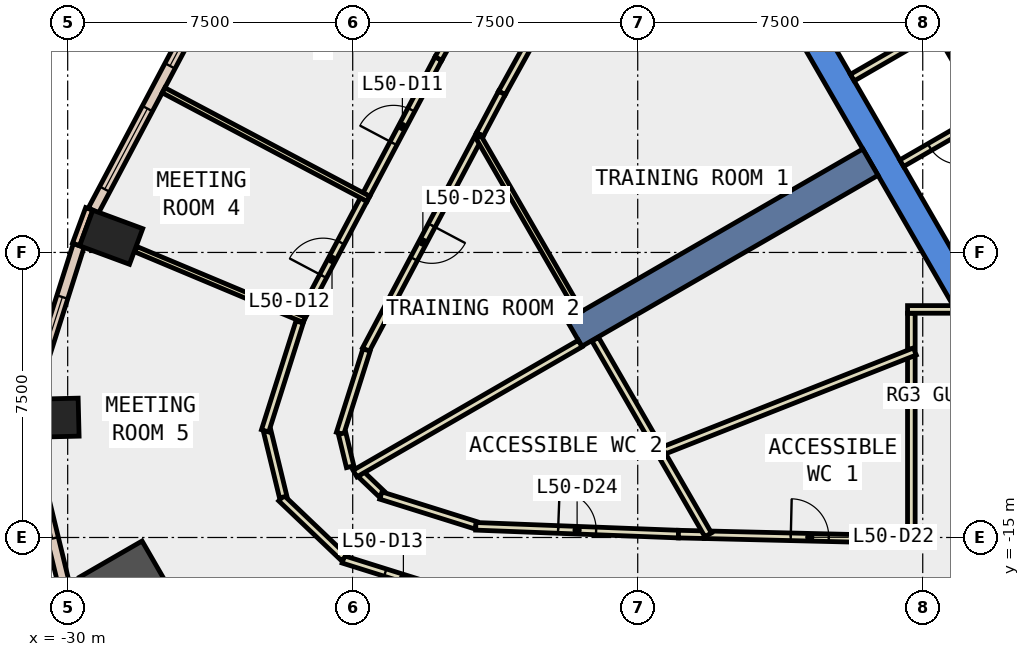
"""IFC4 building model, lengths in metres.
Left out: names, types, materials, properties, quantities, classifications, styles, units other than length and angle.
Written with IfcOpenShell. Run it as: python <this file> out.ifc"""

import sys

from ifc_helpers import new_model, si_unit, direction, frame, frame_2d, origin, origin_2d, place, context, subcontext, project, spatial, polyline, rectangle, outline, extrude, element, fill, save


model = new_model("IFC4")
c1 = context("Model", 3, precision=1e-05, world=origin(), true_north=direction((0.0, 1.0)))
c2 = subcontext(c1, "Body", "Model", "MODEL_VIEW")
j1 = project(units=[si_unit("LENGTHUNIT", "METRE"), si_unit("PLANEANGLEUNIT", "RADIAN")], contexts=[c1])
p1 = place(None, origin())
s1 = spatial("IfcSite", under=j1, at=p1, CompositionType="ELEMENT")
p2 = place(p1, origin())
s2 = spatial("IfcBuilding", under=s1, at=p2, CompositionType="ELEMENT")
p3 = place(p2, frame((0.0, 0.0, 223.4)))
s3 = spatial("IfcBuildingStorey", under=s2, at=p3, CompositionType="ELEMENT", Elevation=223.4)
for number, where, z_axis, x_axis in (
    (1, (-28.856, -7.1, -0.4), (0.0, 0.0, 1.0), (0.347, 0.938, 0.0)),
    (2, (-30.412, -11.851, -0.4), (0.0, 0.0, 1.0), (-0.025, 1.0, 0.0)),
):
    element("IfcColumn", number, at=place(p3, frame(where, z_axis=z_axis, x_axis=x_axis)), inside=s3, PredefinedType="COLUMN", context=c2, shape_type="SweptSolid", body=[
        extrude(rectangle(XDim=1.0, YDim=1.4, at=origin_2d()), origin(), (0.0, 0.0, 1.0), 4.2),
    ])
p4 = place(p3, frame((-28.39, -16.391, -0.4), z_axis=(0.0, 0.0, 1.0), x_axis=(0.866025403784, 0.5, 0.0)))
e3 = element("IfcColumn", 3, at=p4, inside=s3, PredefinedType="COLUMN", context=c2, shape_type="SweptSolid", body=[
    extrude(rectangle(XDim=1.9, YDim=1.9, at=origin_2d()), origin(), (0.0, 0.0, 1.0), 4.2),
])
p5 = place(p3, frame((0.0, 0.0, -0.4)))
e4 = element("IfcWall", 4, at=p5, inside=s3, PredefinedType="SHEAR", context=c2, shape_type="SweptSolid", body=[
    extrude(outline(polyline([(-13.279, 2.5), (-6.64, -9.0), (-6.235, -8.3), (-12.471, 2.5), (-13.279, 2.5)])), origin(), (0.0, 0.0, 1.0), 4.2),
])
p6 = place(p3, frame((-8.877, -5.125, -0.4), z_axis=(0.0, 0.0, 1.0), x_axis=(-0.866017533419, -0.500013631625, 0.0)))
e5 = element("IfcWall", 5, at=p6, inside=s3, PredefinedType="SHEAR", context=c2, shape_type="SweptSolid", body=[
    extrude(rectangle(XDim=9.0, YDim=0.8, at=frame_2d((4.5, 0.0))), origin(), (0.0, 0.0, 1.0), 4.2),
])
p7 = place(p3, frame((-29.433, -6.354, 0.0), z_axis=(0.0, 0.0, 1.0), x_axis=(-0.346892928577, -0.937904737222, 0.0)))
e6 = element("IfcWall", 6, at=p7, inside=s3, PredefinedType="STANDARD", context=c2, shape_type="SweptSolid", body=[
    extrude(rectangle(XDim=1.0, YDim=0.2, at=frame_2d((0.5, 0.0))), origin(), (0.0, 0.0, 1.0), 3.8),
])
p8 = place(p3, frame((-25.887, 0.09, 0.0), z_axis=(0.0, 0.0, 1.0), x_axis=(-0.468020680141, -0.8837175131, 0.0)))
e7 = element("IfcWall", 7, at=p8, inside=s3, PredefinedType="STANDARD", context=c2, shape_type="SweptSolid", body=[
    extrude(rectangle(XDim=7.34, YDim=0.3, at=frame_2d((3.67, 0.0))), origin(), (0.0, 0.0, 1.0), 3.8),
])
p9 = place(p8, frame((0.635, 0.0, 0.9)))
e8 = element("IfcOpeningElement", 8, at=p9, cuts=e7, PredefinedType="OPENING", context=c2, shape_type="SweptSolid", body=[
    extrude(rectangle(XDim=2.4, YDim=2.6, at=frame_2d((1.2, 1.3))), frame((0.0, 0.16, 0.0), z_axis=(0.0, -1.0, 0.0), x_axis=(1.0, 0.0, 0.0)), (0.0, 0.0, 1.0), 0.32),
])
p10 = place(p8, frame((4.305, 0.0, 0.9)))
e9 = element("IfcOpeningElement", 9, at=p10, cuts=e7, PredefinedType="OPENING", context=c2, shape_type="SweptSolid", body=[
    extrude(rectangle(XDim=2.4, YDim=2.6, at=frame_2d((1.2, 1.3))), frame((0.0, 0.16, 0.0), z_axis=(0.0, -1.0, 0.0), x_axis=(1.0, 0.0, 0.0)), (0.0, 0.0, 1.0), 0.32),
])
p11 = place(p3, frame((-29.71, -7.316, 0.0), z_axis=(0.0, 0.0, 1.0), x_axis=(-0.302195467572, -0.953245980521, 0.0)))
e10 = element("IfcWall", 10, at=p11, inside=s3, PredefinedType="STANDARD", context=c2, shape_type="SweptSolid", body=[
    extrude(rectangle(XDim=4.249, YDim=0.3, at=frame_2d((2.125, 0.0))), origin(), (0.0, 0.0, 1.0), 3.8),
])
p12 = place(p11, frame((1.424, 0.0, 0.9)))
e11 = element("IfcOpeningElement", 11, at=p12, cuts=e10, PredefinedType="OPENING", context=c2, shape_type="SweptSolid", body=[
    extrude(rectangle(XDim=1.4, YDim=2.6, at=frame_2d((0.7, 1.3))), frame((0.0, 0.16, 0.0), z_axis=(0.0, -1.0, 0.0), x_axis=(1.0, 0.0, 0.0)), (0.0, 0.0, 1.0), 0.32),
])
p13 = place(p3, frame((-31.038, -12.365, 0.0), z_axis=(0.0, 0.0, 1.0), x_axis=(0.235766276378, -0.971809787419, 0.0)))
e12 = element("IfcWall", 12, at=p13, inside=s3, PredefinedType="STANDARD", context=c2, shape_type="SweptSolid", body=[
    extrude(rectangle(XDim=4.077, YDim=0.3, at=frame_2d((2.039, 0.0))), origin(), (0.0, 0.0, 1.0), 3.8),
])
p14 = place(p13, frame((1.338, 0.0, 0.9)))
e13 = element("IfcOpeningElement", 13, at=p14, cuts=e12, PredefinedType="OPENING", context=c2, shape_type="SweptSolid", body=[
    extrude(rectangle(XDim=1.4, YDim=2.6, at=frame_2d((0.7, 1.3))), frame((0.0, 0.16, 0.0), z_axis=(0.0, -1.0, 0.0), x_axis=(1.0, 0.0, 0.0)), (0.0, 0.0, 1.0), 0.32),
])
p15 = place(p3, frame((-14.652, 3.783, 0.0), z_axis=(0.0, 0.0, 1.0), x_axis=(-0.484249955458, -0.874929700398, 0.0)))
e14 = element("IfcWall", 14, at=p15, inside=s3, PredefinedType="PARTITIONING", context=c2, shape_type="SweptSolid", body=[
    extrude(rectangle(XDim=8.099, YDim=0.2, at=frame_2d((4.049, 0.0))), origin(), (0.0, 0.0, 1.0), 3.8),
])
p16 = place(p15, frame((3.55, 0.0, 0.0)))
e15 = element("IfcOpeningElement", 15, at=p16, cuts=e14, PredefinedType="OPENING", context=c2, shape_type="SweptSolid", body=[
    extrude(rectangle(XDim=1.0, YDim=2.1, at=frame_2d((0.5, 1.05))), frame((0.0, 0.11, 0.0), z_axis=(0.0, -1.0, 0.0), x_axis=(1.0, 0.0, 0.0)), (0.0, 0.0, 1.0), 0.22),
])
p17 = place(p3, frame((-18.574, -3.303, 0.0), z_axis=(0.0, 0.0, 1.0), x_axis=(-0.468458328651, -0.883485593724, 0.0)))
e16 = element("IfcWall", 16, at=p17, inside=s3, PredefinedType="PARTITIONING", context=c2, shape_type="SweptSolid", body=[
    extrude(rectangle(XDim=1.238, YDim=0.2, at=frame_2d((0.619, 0.0))), origin(), (0.0, 0.0, 1.0), 3.8),
])
p18 = place(p3, frame((-13.246, -14.927, 0.0), z_axis=(0.0, 0.0, 1.0), x_axis=(0.999708107757, -0.024159869312, 0.0)))
e17 = element("IfcWall", 17, at=p18, inside=s3, PredefinedType="PARTITIONING", context=c2, shape_type="SweptSolid", body=[
    extrude(rectangle(XDim=5.548, YDim=0.2, at=frame_2d((2.774, 0.0))), origin(), (0.0, 0.0, 1.0), 3.8),
])
p19 = place(p18, frame((2.274, 0.0, 0.0)))
e18 = element("IfcOpeningElement", 18, at=p19, cuts=e17, PredefinedType="OPENING", context=c2, shape_type="SweptSolid", body=[
    extrude(rectangle(XDim=1.0, YDim=2.1, at=frame_2d((0.5, 1.05))), frame((0.0, 0.11, 0.0), z_axis=(0.0, -1.0, 0.0), x_axis=(1.0, 0.0, 0.0)), (0.0, 0.0, 1.0), 0.22),
])
p20 = place(p3, frame((-19.154, -4.397, 0.0), z_axis=(0.0, 0.0, 1.0), x_axis=(-0.468118749105, -0.883665568378, 0.0)))
e19 = element("IfcWall", 19, at=p20, inside=s3, PredefinedType="PARTITIONING", context=c2, shape_type="SweptSolid", body=[
    extrude(rectangle(XDim=6.409, YDim=0.2, at=frame_2d((3.204, 0.0))), origin(), (0.0, 0.0, 1.0), 3.8),
])
p21 = place(p20, frame((2.704, 0.0, 0.0)))
e20 = element("IfcOpeningElement", 20, at=p21, cuts=e19, PredefinedType="OPENING", context=c2, shape_type="SweptSolid", body=[
    extrude(rectangle(XDim=1.0, YDim=2.1, at=frame_2d((0.5, 1.05))), frame((0.0, 0.11, 0.0), z_axis=(0.0, -1.0, 0.0), x_axis=(1.0, 0.0, 0.0)), (0.0, 0.0, 1.0), 0.22),
])
p22 = place(p3, frame((-22.137, -10.067, 0.0), z_axis=(0.0, 0.0, 1.0), x_axis=(-0.302262657712, -0.953224677478, 0.0)))
e21 = element("IfcWall", 21, at=p22, inside=s3, PredefinedType="PARTITIONING", context=c2, shape_type="SweptSolid", body=[
    extrude(rectangle(XDim=2.303, YDim=0.2, at=frame_2d((1.151, 0.0))), origin(), (0.0, 0.0, 1.0), 3.8),
])
p23 = place(p3, frame((-22.779, -12.264, 0.0), z_axis=(0.0, 0.0, 1.0), x_axis=(0.2356388299, -0.971840697771, 0.0)))
e22 = element("IfcWall", 22, at=p23, inside=s3, PredefinedType="PARTITIONING", context=c2, shape_type="SweptSolid", body=[
    extrude(rectangle(XDim=0.9, YDim=0.2, at=frame_2d((0.45, 0.0))), origin(), (0.0, 0.0, 1.0), 3.8),
])
p24 = place(p3, frame((-22.281, -13.337, 0.0), z_axis=(0.0, 0.0, 1.0), x_axis=(0.723443840005, -0.690383234413, 0.0)))
e23 = element("IfcWall", 23, at=p24, inside=s3, PredefinedType="PARTITIONING", context=c2, shape_type="SweptSolid", body=[
    extrude(rectangle(XDim=0.753, YDim=0.2, at=frame_2d((0.376, 0.0))), origin(), (0.0, 0.0, 1.0), 3.8),
])
p25 = place(p3, frame((-21.759, -13.896, 0.0), z_axis=(0.0, 0.0, 1.0), x_axis=(0.954254371194, -0.298995978328, 0.0)))
e24 = element("IfcWall", 24, at=p25, inside=s3, PredefinedType="PARTITIONING", context=c2, shape_type="SweptSolid", body=[
    extrude(rectangle(XDim=2.622, YDim=0.2, at=frame_2d((1.311, 0.0))), origin(), (0.0, 0.0, 1.0), 3.8),
])
p26 = place(p3, frame((-19.261, -14.706, 0.0), z_axis=(0.0, 0.0, 1.0), x_axis=(0.999262930749, -0.038387435847, 0.0)))
e25 = element("IfcWall", 25, at=p26, inside=s3, PredefinedType="PARTITIONING", context=c2, shape_type="SweptSolid", body=[
    extrude(rectangle(XDim=5.336, YDim=0.2, at=frame_2d((2.668, 0.0))), origin(), (0.0, 0.0, 1.0), 3.8),
])
p27 = place(p26, frame((2.168, 0.0, 0.0)))
e26 = element("IfcOpeningElement", 26, at=p27, cuts=e25, PredefinedType="OPENING", context=c2, shape_type="SweptSolid", body=[
    extrude(rectangle(XDim=1.0, YDim=2.1, at=frame_2d((0.5, 1.05))), frame((0.0, 0.11, 0.0), z_axis=(0.0, -1.0, 0.0), x_axis=(1.0, 0.0, 0.0)), (0.0, 0.0, 1.0), 0.22),
])
p28 = place(p3, frame((-13.929, -14.911, 0.0), z_axis=(0.0, 0.0, 1.0), x_axis=(0.999721713829, -0.023590144123, 0.0)))
e27 = element("IfcWall", 27, at=p28, inside=s3, PredefinedType="PARTITIONING", context=c2, shape_type="SweptSolid", body=[
    extrude(rectangle(XDim=0.683, YDim=0.2, at=frame_2d((0.342, 0.0))), origin(), (0.0, 0.0, 1.0), 3.8),
])
p29 = place(p3, frame((-22.14, -5.976, 0.0), z_axis=(0.0, 0.0, 1.0), x_axis=(0.467979143965, 0.883739509592, 0.0)))
e28 = element("IfcWall", 28, at=p29, inside=s3, PredefinedType="PARTITIONING", context=c2, shape_type="SweptSolid", body=[
    extrude(rectangle(XDim=4.049, YDim=0.2, at=frame_2d((2.024, 0.0))), origin(), (0.0, 0.0, 1.0), 3.8),
])
p30 = place(p29, frame((1.524, 0.0, 0.0)))
e29 = element("IfcOpeningElement", 29, at=p30, cuts=e28, PredefinedType="OPENING", context=c2, shape_type="SweptSolid", body=[
    extrude(rectangle(XDim=1.0, YDim=2.1, at=frame_2d((0.5, 1.05))), frame((0.0, 0.11, 0.0), z_axis=(0.0, -1.0, 0.0), x_axis=(1.0, 0.0, 0.0)), (0.0, 0.0, 1.0), 0.22),
])
p31 = place(p3, frame((-20.245, -2.398, 0.0), z_axis=(0.0, 0.0, 1.0), x_axis=(0.484328424129, 0.874886265511, 0.0)))
e30 = element("IfcWall", 30, at=p31, inside=s3, PredefinedType="PARTITIONING", context=c2, shape_type="SweptSolid", body=[
    extrude(rectangle(XDim=3.991, YDim=0.2, at=frame_2d((1.996, 0.0))), origin(), (0.0, 0.0, 1.0), 3.8),
])
p32 = place(p3, frame((-23.878, -9.256, 0.0), z_axis=(0.0, 0.0, 1.0), x_axis=(0.46795384568, 0.883752905689, 0.0)))
e31 = element("IfcWall", 31, at=p32, inside=s3, PredefinedType="PARTITIONING", context=c2, shape_type="SweptSolid", body=[
    extrude(rectangle(XDim=3.562, YDim=0.2, at=frame_2d((1.781, 0.0))), origin(), (0.0, 0.0, 1.0), 3.8),
])
p33 = place(p32, frame((1.281, 0.0, 0.0)))
e32 = element("IfcOpeningElement", 32, at=p33, cuts=e31, PredefinedType="OPENING", context=c2, shape_type="SweptSolid", body=[
    extrude(rectangle(XDim=1.0, YDim=2.1, at=frame_2d((0.5, 1.05))), frame((0.0, 0.11, 0.0), z_axis=(0.0, -1.0, 0.0), x_axis=(1.0, 0.0, 0.0)), (0.0, 0.0, 1.0), 0.22),
])
p34 = place(p3, frame((-19.583, -16.569, 0.0), z_axis=(0.0, 0.0, 1.0), x_axis=(-0.954238750745, 0.299045826884, 0.0)))
e33 = element("IfcWall", 33, at=p34, inside=s3, PredefinedType="PARTITIONING", context=c2, shape_type="SweptSolid", body=[
    extrude(rectangle(XDim=3.318, YDim=0.2, at=frame_2d((1.659, 0.0))), origin(), (0.0, 0.0, 1.0), 3.8),
])
p35 = place(p34, frame((1.159, 0.0, 0.0)))
e34 = element("IfcOpeningElement", 34, at=p35, cuts=e33, PredefinedType="OPENING", context=c2, shape_type="SweptSolid", body=[
    extrude(rectangle(XDim=1.0, YDim=2.1, at=frame_2d((0.5, 1.05))), frame((0.0, 0.11, 0.0), z_axis=(0.0, -1.0, 0.0), x_axis=(1.0, 0.0, 0.0)), (0.0, 0.0, 1.0), 0.22),
])
p36 = place(p3, frame((-22.726, -15.538, 0.0), z_axis=(0.0, 0.0, 1.0), x_axis=(-0.723967420116, 0.689834164571, 0.0)))
e35 = element("IfcWall", 35, at=p36, inside=s3, PredefinedType="PARTITIONING", context=c2, shape_type="SweptSolid", body=[
    extrude(rectangle(XDim=2.282, YDim=0.2, at=frame_2d((1.141, 0.0))), origin(), (0.0, 0.0, 1.0), 3.8),
])
p37 = place(p3, frame((-24.329, -13.935, 0.0), z_axis=(0.0, 0.0, 1.0), x_axis=(-0.235756216468, 0.971812227952, 0.0)))
e36 = element("IfcWall", 36, at=p37, inside=s3, PredefinedType="PARTITIONING", context=c2, shape_type="SweptSolid", body=[
    extrude(rectangle(XDim=1.79, YDim=0.2, at=frame_2d((0.895, 0.0))), origin(), (0.0, 0.0, 1.0), 3.8),
])
p38 = place(p3, frame((-24.805, -12.194, 0.0), z_axis=(0.0, 0.0, 1.0), x_axis=(0.302200639646, 0.953244340868, 0.0)))
e37 = element("IfcWall", 37, at=p38, inside=s3, PredefinedType="PARTITIONING", context=c2, shape_type="SweptSolid", body=[
    extrude(rectangle(XDim=3.004, YDim=0.2, at=frame_2d((1.502, 0.0))), origin(), (0.0, 0.0, 1.0), 3.8),
])
p39 = place(p3, frame((-7.188, -1.65, 0.0), z_axis=(0.0, 0.0, 1.0), x_axis=(-0.866022959057, -0.500004234368, 0.0)))
e38 = element("IfcWall", 38, at=p39, inside=s3, PredefinedType="PARTITIONING", context=c2, shape_type="SweptSolid", body=[
    extrude(rectangle(XDim=2.5, YDim=0.2, at=frame_2d((1.25, 0.0))), origin(), (0.0, 0.0, 1.0), 3.8),
])
p40 = place(p3, frame((-7.051, -1.687, 0.0), z_axis=(0.0, 0.0, 1.0), x_axis=(0.500128937424, -0.865950948929, 0.0)))
e39 = element("IfcWall", 39, at=p40, inside=s3, PredefinedType="PARTITIONING", context=c2, shape_type="SweptSolid", body=[
    extrude(rectangle(XDim=2.599, YDim=0.2, at=frame_2d((1.3, 0.0))), origin(), (0.0, 0.0, 1.0), 3.8),
])
p41 = place(p3, frame((-5.888, -3.902, 0.0), z_axis=(0.0, 0.0, 1.0), x_axis=(-0.866022959057, -0.500004234368, 0.0)))
e40 = element("IfcWall", 40, at=p41, inside=s3, PredefinedType="PARTITIONING", context=c2, shape_type="SweptSolid", body=[
    extrude(rectangle(XDim=2.5, YDim=0.2, at=frame_2d((1.25, 0.0))), origin(), (0.0, 0.0, 1.0), 3.8),
])
p42 = place(p41, frame((0.75, 0.0, 0.0)))
e41 = element("IfcOpeningElement", 41, at=p42, cuts=e40, PredefinedType="OPENING", context=c2, shape_type="SweptSolid", body=[
    extrude(rectangle(XDim=0.9, YDim=2.1, at=frame_2d((0.45, 1.05))), frame((0.0, 0.11, 0.0), z_axis=(0.0, -1.0, 0.0), x_axis=(1.0, 0.0, 0.0)), (0.0, 0.0, 1.0), 0.22),
])
p43 = place(p3, frame((-7.8, -10.041, 0.0), z_axis=(0.0, 0.0, 1.0), x_axis=(0.0, 1.0, 0.0)))
e42 = element("IfcWall", 42, at=p43, inside=s3, PredefinedType="PARTITIONING", context=c2, shape_type="SweptSolid", body=[
    extrude(rectangle(XDim=0.942, YDim=0.2, at=frame_2d((0.471, 0.0))), origin(), (0.0, 0.0, 1.0), 3.8),
])
p44 = place(p3, frame((-7.9, -8.999, 0.0), z_axis=(0.0, 0.0, 1.0), x_axis=(1.0, 0.0, 0.0)))
e43 = element("IfcWall", 43, at=p44, inside=s3, PredefinedType="PARTITIONING", context=c2, shape_type="SweptSolid", body=[
    extrude(rectangle(XDim=1.259, YDim=0.2, at=frame_2d((0.629, 0.0))), origin(), (0.0, 0.0, 1.0), 3.8),
])
p45 = place(p3, frame((-7.8, -14.959, 0.0), z_axis=(0.0, 0.0, 1.0), x_axis=(0.0, 1.0, 0.0)))
e44 = element("IfcWall", 44, at=p45, inside=s3, PredefinedType="PARTITIONING", context=c2, shape_type="SweptSolid", body=[
    extrude(rectangle(XDim=4.718, YDim=0.2, at=frame_2d((2.359, 0.0))), origin(), (0.0, 0.0, 1.0), 3.8),
])
p46 = place(p3, frame((-7.707, -10.105, 0.0), z_axis=(0.0, 0.0, 1.0), x_axis=(-0.930316800812, -0.36675693603, 0.0)))
e45 = element("IfcWall", 45, at=p46, inside=s3, PredefinedType="PARTITIONING", context=c2, shape_type="SweptSolid", body=[
    extrude(rectangle(XDim=7.302, YDim=0.2, at=frame_2d((3.651, 0.0))), origin(), (0.0, 0.0, 1.0), 3.8),
])
p47 = place(p3, frame((-16.525, -9.079, 0.0), z_axis=(0.0, 0.0, 1.0), x_axis=(-0.499943228252, 0.866058178487, 0.0)))
e46 = element("IfcWall", 46, at=p47, inside=s3, PredefinedType="PARTITIONING", context=c2, shape_type="SweptSolid", body=[
    extrude(rectangle(XDim=5.329, YDim=0.15, at=frame_2d((2.664, 0.0))), origin(), (0.0, 0.0, 1.0), 3.8),
])
p48 = place(p3, frame((-14.457, -12.66, 0.0), z_axis=(0.0, 0.0, 1.0), x_axis=(-0.49997268395, 0.866041174139, 0.0)))
e47 = element("IfcWall", 47, at=p48, inside=s3, PredefinedType="PARTITIONING", context=c2, shape_type="SweptSolid", body=[
    extrude(rectangle(XDim=3.322, YDim=0.2, at=frame_2d((1.661, 0.0))), origin(), (0.0, 0.0, 1.0), 3.8),
])
p49 = place(p3, frame((-13.146, -14.93, 0.0), z_axis=(0.0, 0.0, 1.0), x_axis=(-0.500086091327, 0.865975693228, 0.0)))
e48 = element("IfcWall", 48, at=p49, inside=s3, PredefinedType="PARTITIONING", context=c2, shape_type="SweptSolid", body=[
    extrude(rectangle(XDim=2.421, YDim=0.2, at=frame_2d((1.211, 0.0))), origin(), (0.0, 0.0, 1.0), 3.8),
])
p50 = place(p3, frame((-16.514, -9.897, 0.0), z_axis=(0.0, 0.0, 1.0), x_axis=(-0.866041209536, -0.499972622635, 0.0)))
e49 = element("IfcWall", 49, at=p50, inside=s3, PredefinedType="PARTITIONING", context=c2, shape_type="SweptSolid", body=[
    extrude(rectangle(XDim=6.843, YDim=0.2, at=frame_2d((3.421, 0.0))), origin(), (0.0, 0.0, 1.0), 3.8),
])
p51 = place(p3, frame((-22.087, -6.089, 0.0), z_axis=(0.0, 0.0, 1.0), x_axis=(-0.883611647524, 0.468220521079, 0.0)))
e50 = element("IfcWall", 50, at=p51, inside=s3, PredefinedType="PARTITIONING", context=c2, shape_type="SweptSolid", body=[
    extrude(rectangle(XDim=6.1, YDim=0.15, at=frame_2d((3.05, 0.0))), origin(), (0.0, 0.0, 1.0), 3.8),
])
p52 = place(p3, frame((-23.774, -9.273, 0.0), z_axis=(0.0, 0.0, 1.0), x_axis=(-0.922217762148, 0.386670918454, 0.0)))
e51 = element("IfcWall", 51, at=p52, inside=s3, PredefinedType="PARTITIONING", context=c2, shape_type="SweptSolid", body=[
    extrude(rectangle(XDim=4.805, YDim=0.15, at=frame_2d((2.402, 0.0))), origin(), (0.0, 0.0, 1.0), 3.8),
])
p53 = place(p3, frame((-8.192, 0.888, 0.0), z_axis=(0.0, 0.0, 1.0), x_axis=(0.500034260056, -0.866005622828, 0.0)))
e52 = element("IfcWall", 52, at=p53, inside=s3, PredefinedType="STANDARD", context=c2, shape_type="SweptSolid", body=[
    extrude(rectangle(XDim=5.399, YDim=0.2, at=frame_2d((2.7, 0.0))), origin(), (0.0, 0.0, 1.0), 3.8),
])
p54 = place(p9, origin())
e53 = element("IfcWindow", 53, at=p54, inside=s3, PartitioningType="SINGLE_PANEL", PredefinedType="WINDOW", context=c2, shape_type="SweptSolid", body=[
    extrude(rectangle(XDim=2.4, YDim=2.6, at=frame_2d((1.2, 1.3))), frame((0.0, 0.03, 0.0), z_axis=(0.0, -1.0, 0.0), x_axis=(1.0, 0.0, 0.0)), (0.0, 0.0, 1.0), 0.06),
])
fill(e8, e53)
p55 = place(p10, origin())
e54 = element("IfcWindow", 54, at=p55, inside=s3, PartitioningType="SINGLE_PANEL", PredefinedType="WINDOW", context=c2, shape_type="SweptSolid", body=[
    extrude(rectangle(XDim=2.4, YDim=2.6, at=frame_2d((1.2, 1.3))), frame((0.0, 0.03, 0.0), z_axis=(0.0, -1.0, 0.0), x_axis=(1.0, 0.0, 0.0)), (0.0, 0.0, 1.0), 0.06),
])
fill(e9, e54)
p56 = place(p12, origin())
e55 = element("IfcWindow", 55, at=p56, inside=s3, PartitioningType="SINGLE_PANEL", PredefinedType="WINDOW", context=c2, shape_type="SweptSolid", body=[
    extrude(rectangle(XDim=1.4, YDim=2.6, at=frame_2d((0.7, 1.3))), frame((0.0, 0.03, 0.0), z_axis=(0.0, -1.0, 0.0), x_axis=(1.0, 0.0, 0.0)), (0.0, 0.0, 1.0), 0.06),
])
fill(e11, e55)
p57 = place(p14, origin())
e56 = element("IfcWindow", 56, at=p57, inside=s3, PartitioningType="SINGLE_PANEL", PredefinedType="WINDOW", context=c2, shape_type="SweptSolid", body=[
    extrude(rectangle(XDim=1.4, YDim=2.6, at=frame_2d((0.7, 1.3))), frame((0.0, 0.03, 0.0), z_axis=(0.0, -1.0, 0.0), x_axis=(1.0, 0.0, 0.0)), (0.0, 0.0, 1.0), 0.06),
])
fill(e13, e56)
p58 = place(p30, origin())
e57 = element("IfcDoor", 57, at=p58, inside=s3, OperationType="SINGLE_SWING_LEFT", PredefinedType="DOOR", context=c2, shape_type="SweptSolid", body=[
    extrude(rectangle(XDim=1.0, YDim=2.1, at=frame_2d((0.5, 1.05))), frame((0.0, 0.025, 0.0), z_axis=(0.0, -1.0, 0.0), x_axis=(1.0, 0.0, 0.0)), (0.0, 0.0, 1.0), 0.05),
])
fill(e29, e57)
p59 = place(p33, origin())
e58 = element("IfcDoor", 58, at=p59, inside=s3, OperationType="SINGLE_SWING_LEFT", PredefinedType="DOOR", context=c2, shape_type="SweptSolid", body=[
    extrude(rectangle(XDim=1.0, YDim=2.1, at=frame_2d((0.5, 1.05))), frame((0.0, 0.025, 0.0), z_axis=(0.0, -1.0, 0.0), x_axis=(1.0, 0.0, 0.0)), (0.0, 0.0, 1.0), 0.05),
])
fill(e32, e58)
p60 = place(p35, origin())
e59 = element("IfcDoor", 59, at=p60, inside=s3, OperationType="SINGLE_SWING_RIGHT", PredefinedType="DOOR", context=c2, shape_type="SweptSolid", body=[
    extrude(rectangle(XDim=1.0, YDim=2.1, at=frame_2d((0.5, 1.05))), frame((0.0, 0.025, 0.0), z_axis=(0.0, -1.0, 0.0), x_axis=(1.0, 0.0, 0.0)), (0.0, 0.0, 1.0), 0.05),
])
fill(e34, e59)
p61 = place(p19, origin())
e60 = element("IfcDoor", 60, at=p61, inside=s3, OperationType="SINGLE_SWING_LEFT", PredefinedType="DOOR", context=c2, shape_type="SweptSolid", body=[
    extrude(rectangle(XDim=1.0, YDim=2.1, at=frame_2d((0.5, 1.05))), frame((0.0, 0.025, 0.0), z_axis=(0.0, -1.0, 0.0), x_axis=(1.0, 0.0, 0.0)), (0.0, 0.0, 1.0), 0.05),
])
fill(e18, e60)
p62 = place(p21, origin())
e61 = element("IfcDoor", 61, at=p62, inside=s3, OperationType="SINGLE_SWING_LEFT", PredefinedType="DOOR", context=c2, shape_type="SweptSolid", body=[
    extrude(rectangle(XDim=1.0, YDim=2.1, at=frame_2d((0.5, 1.05))), frame((0.0, 0.025, 0.0), z_axis=(0.0, -1.0, 0.0), x_axis=(1.0, 0.0, 0.0)), (0.0, 0.0, 1.0), 0.05),
])
fill(e20, e61)
p63 = place(p27, origin())
e62 = element("IfcDoor", 62, at=p63, inside=s3, OperationType="SINGLE_SWING_LEFT", PredefinedType="DOOR", context=c2, shape_type="SweptSolid", body=[
    extrude(rectangle(XDim=1.0, YDim=2.1, at=frame_2d((0.5, 1.05))), frame((0.0, 0.025, 0.0), z_axis=(0.0, -1.0, 0.0), x_axis=(1.0, 0.0, 0.0)), (0.0, 0.0, 1.0), 0.05),
])
fill(e26, e62)
p64 = place(p42, origin())
e63 = element("IfcDoor", 63, at=p64, inside=s3, OperationType="SINGLE_SWING_RIGHT", PredefinedType="DOOR", context=c2, shape_type="SweptSolid", body=[
    extrude(rectangle(XDim=0.9, YDim=2.1, at=frame_2d((0.45, 1.05))), frame((0.0, 0.025, 0.0), z_axis=(0.0, -1.0, 0.0), x_axis=(1.0, 0.0, 0.0)), (0.0, 0.0, 1.0), 0.05),
])
fill(e41, e63)
save(model, sys.argv[1])
